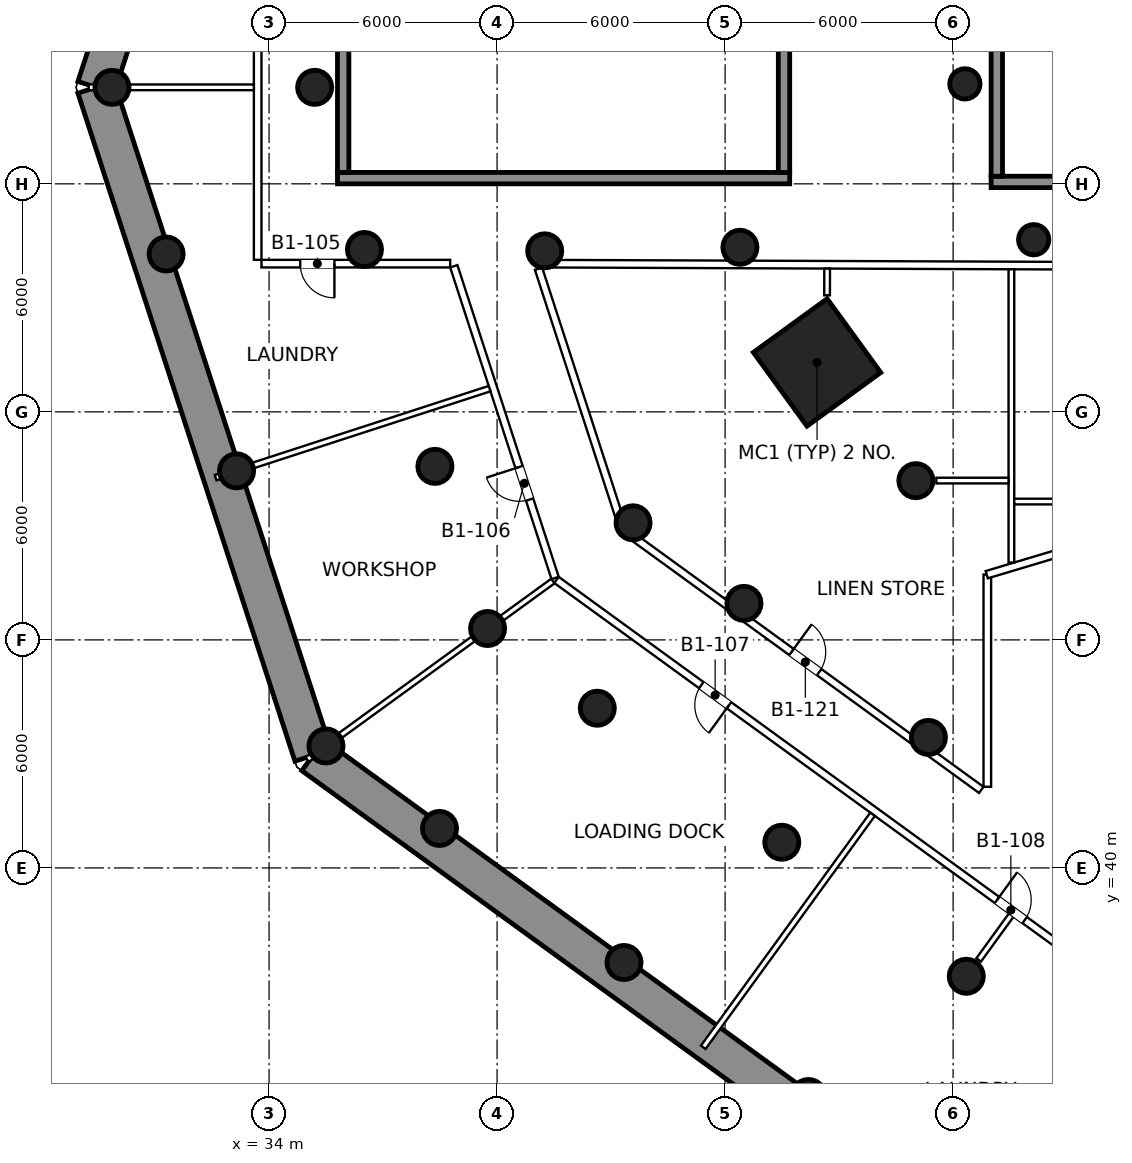
"""IFC4 building model, lengths in metres.
Left out: names, types, materials, properties, quantities, classifications, styles, units other than length and angle.
Written with IfcOpenShell. Run it as: python <this file> out.ifc"""

import sys

from ifc_helpers import new_model, si_unit, direction, frame, frame_2d, origin, origin_2d, place, context, subcontext, project, spatial, rectangle, circle, extrude, element, fill, save


model = new_model("IFC4")
c1 = context("Model", 3, precision=1e-05, world=origin(), true_north=direction((0.0, 1.0)))
c2 = subcontext(c1, "Body", "Model", "MODEL_VIEW")
j1 = project(units=[si_unit("LENGTHUNIT", "METRE"), si_unit("PLANEANGLEUNIT", "RADIAN")], contexts=[c1])
p1 = place(None, origin())
s1 = spatial("IfcSite", under=j1, at=p1, CompositionType="ELEMENT")
p2 = place(p1, origin())
s2 = spatial("IfcBuilding", under=s1, at=p2, CompositionType="ELEMENT")
p3 = place(p2, frame((0.0, 0.0, -5.0)))
s3 = spatial("IfcBuildingStorey", under=s2, at=p3, CompositionType="ELEMENT", Elevation=-5.0)
p4 = place(p3, frame((60.76, 24.361, 0.0), z_axis=(0.0, 0.0, 1.0), x_axis=(-0.809018883304, 0.587782652396, 0.0)))
e1 = element("IfcWall", 1, at=p4, inside=s3, PredefinedType="SOLIDWALL", context=c2, shape_type="SweptSolid", body=[
    extrude(rectangle(XDim=31.647, YDim=1.0, at=frame_2d((15.823, 0.0))), origin(), (0.0, 0.0, 1.0), 4.55),
])
p5 = place(p3, frame((35.156, 42.963, 0.0), z_axis=(0.0, 0.0, 1.0), x_axis=(-0.309001835939, 0.951061441436, 0.0)))
e2 = element("IfcWall", 2, at=p5, inside=s3, PredefinedType="SOLIDWALL", context=c2, shape_type="SweptSolid", body=[
    extrude(rectangle(XDim=18.481, YDim=1.0, at=frame_2d((9.241, 0.0))), origin(), (0.0, 0.0, 1.0), 4.55),
])
p6 = place(p3, frame((29.446, 60.539, 0.0), z_axis=(0.0, 0.0, 1.0), x_axis=(0.309015382076, 0.951057040161, 0.0)))
e3 = element("IfcWall", 3, at=p6, inside=s3, PredefinedType="SOLIDWALL", context=c2, shape_type="SweptSolid", body=[
    extrude(rectangle(XDim=28.348, YDim=1.0, at=frame_2d((14.174, 0.0))), origin(), (0.0, 0.0, 1.0), 4.55),
])
p7 = place(p3, frame((46.39, 56.33, 0.0), z_axis=(0.0, 0.0, 1.0), x_axis=(1.0, 0.0, 0.0)))
e4 = element("IfcColumn", 4, at=p7, inside=s3, PredefinedType="COLUMN", context=c2, shape_type="SweptSolid", body=[
    extrude(circle(Radius=0.45, at=origin_2d()), origin(), (0.0, 0.0, 1.0), 5.0),
])
p8 = place(p3, frame((48.42, 53.3, 0.0), z_axis=(0.0, 0.0, 1.0), x_axis=(-0.809016994375, -0.587785252292, 0.0)))
e5 = element("IfcColumn", 5, at=p8, inside=s3, PredefinedType="COLUMN", context=c2, shape_type="SweptSolid", body=[
    extrude(rectangle(XDim=2.4, YDim=2.4, at=origin_2d()), origin(), (0.0, 0.0, 1.0), 5.0),
])
p9 = place(p3, frame((51.02, 50.19, 0.0), z_axis=(0.0, 0.0, 1.0), x_axis=(1.0, 0.0, 0.0)))
e6 = element("IfcColumn", 6, at=p9, inside=s3, PredefinedType="COLUMN", context=c2, shape_type="SweptSolid", body=[
    extrude(circle(Radius=0.45, at=origin_2d()), origin(), (0.0, 0.0, 1.0), 5.0),
])
for number, where, z_axis, x_axis in (
    (7, (52.31, 60.63, 0.0), (0.0, 0.0, 1.0), (1.0, 0.0, 0.0)),
    (8, (54.12, 56.53, 0.0), (0.0, 0.0, 1.0), (1.0, 0.0, 0.0)),
):
    element("IfcColumn", number, at=place(p3, frame(where, z_axis=z_axis, x_axis=x_axis)), inside=s3, PredefinedType="COLUMN", context=c2, shape_type="SweptSolid", body=[
        extrude(circle(Radius=0.4, at=origin_2d()), origin(), (0.0, 0.0, 1.0), 5.0),
    ])
for number, where, z_axis, x_axis in (
    (9, (29.866, 60.539, 0.0), (0.0, 0.0, 1.0), (1.0, 0.0, 0.0)),
    (10, (31.291, 56.154, 0.0), (0.0, 0.0, 1.0), (1.0, 0.0, 0.0)),
    (11, (33.145, 50.448, 0.0), (0.0, 0.0, 1.0), (1.0, 0.0, 0.0)),
    (12, (35.497, 43.21, 0.0), (0.0, 0.0, 1.0), (1.0, 0.0, 0.0)),
    (13, (38.485, 41.039, 0.0), (0.0, 0.0, 1.0), (1.0, 0.0, 0.0)),
    (14, (43.339, 37.512, 0.0), (0.0, 0.0, 1.0), (1.0, 0.0, 0.0)),
    (15, (48.193, 33.985, 0.0), (0.0, 0.0, 1.0), (1.0, 0.0, 0.0)),
    (16, (35.2, 60.539, 0.0), (0.0, 0.0, 1.0), (1.0, 0.0, 0.0)),
    (17, (36.51, 56.273, 0.0), (0.0, 0.0, 1.0), (1.0, 0.0, 0.0)),
    (18, (38.364, 50.566, 0.0), (0.0, 0.0, 1.0), (1.0, 0.0, 0.0)),
    (19, (39.75, 46.3, 0.0), (0.0, 0.0, 1.0), (1.0, 0.0, 0.0)),
    (20, (42.637, 44.202, 0.0), (0.0, 0.0, 1.0), (1.0, 0.0, 0.0)),
    (21, (47.492, 40.676, 0.0), (0.0, 0.0, 1.0), (1.0, 0.0, 0.0)),
    (22, (52.346, 37.149, 0.0), (0.0, 0.0, 1.0), (1.0, 0.0, 0.0)),
    (23, (41.253, 56.237, 0.0), (0.0, 0.0, 1.0), (1.0, 0.0, 0.0)),
    (24, (43.578, 49.081, 0.0), (0.0, 0.0, 1.0), (1.0, 0.0, 0.0)),
    (25, (46.496, 46.961, 0.0), (0.0, 0.0, 1.0), (1.0, 0.0, 0.0)),
    (26, (51.35, 43.434, 0.0), (0.0, 0.0, 1.0), (1.0, 0.0, 0.0)),
):
    element("IfcColumn", number, at=place(p3, frame(where, z_axis=z_axis, x_axis=x_axis)), inside=s3, PredefinedType="COLUMN", context=c2, shape_type="SweptSolid", body=[
        extrude(circle(Radius=0.45, at=origin_2d()), origin(), (0.0, 0.0, 1.0), 5.0),
    ])
p10 = place(p3, frame((53.0, 58.05, 0.0), z_axis=(0.0, 0.0, 1.0), x_axis=(1.0, 0.0, 0.0)))
e27 = element("IfcWall", 27, at=p10, inside=s3, PredefinedType="SHEAR", context=c2, shape_type="SweptSolid", body=[
    extrude(rectangle(XDim=11.9, YDim=0.3, at=frame_2d((5.95, 0.0))), origin(), (0.0, 0.0, 1.0), 4.55),
])
p11 = place(p3, frame((53.15, 58.2, 0.0), z_axis=(0.0, 0.0, 1.0), x_axis=(0.0, 1.0, 0.0)))
e28 = element("IfcWall", 28, at=p11, inside=s3, PredefinedType="SHEAR", context=c2, shape_type="SweptSolid", body=[
    extrude(rectangle(XDim=3.35, YDim=0.3, at=frame_2d((1.675, 0.0))), origin(), (0.0, 0.0, 1.0), 4.55),
])
p12 = place(p3, frame((35.8, 58.15, 0.0), z_axis=(0.0, 0.0, 1.0), x_axis=(1.0, 0.0, 0.0)))
e29 = element("IfcWall", 29, at=p12, inside=s3, PredefinedType="SHEAR", context=c2, shape_type="SweptSolid", body=[
    extrude(rectangle(XDim=11.9, YDim=0.3, at=frame_2d((5.95, 0.0))), origin(), (0.0, 0.0, 1.0), 4.55),
])
for number, where, z_axis, x_axis in (
    (30, (35.95, 58.3, 0.0), (0.0, 0.0, 1.0), (0.0, 1.0, 0.0)),
    (31, (47.55, 58.3, 0.0), (0.0, 0.0, 1.0), (0.0, 1.0, 0.0)),
):
    element("IfcWall", number, at=place(p3, frame(where, z_axis=z_axis, x_axis=x_axis)), inside=s3, PredefinedType="SHEAR", context=c2, shape_type="SweptSolid", body=[
        extrude(rectangle(XDim=3.35, YDim=0.3, at=frame_2d((1.675, 0.0))), origin(), (0.0, 0.0, 1.0), 4.55),
    ])
p13 = place(p3, frame((41.527, 47.629, 0.0), z_axis=(0.0, 0.0, 1.0), x_axis=(-0.309050865735, 0.951045510156, 0.0)))
e32 = element("IfcWall", 32, at=p13, inside=s3, PredefinedType="PARTITIONING", context=c2, shape_type="SweptSolid", body=[
    extrude(rectangle(XDim=8.624, YDim=0.2, at=frame_2d((4.312, 0.0))), origin(), (0.0, 0.0, 1.0), 4.55),
])
p14 = place(p13, frame((2.169, 0.0, 0.0)))
e33 = element("IfcOpeningElement", 33, at=p14, cuts=e32, PredefinedType="OPENING", context=c2, shape_type="SweptSolid", body=[
    extrude(rectangle(XDim=0.9, YDim=2.1, at=frame_2d((0.45, 1.05))), frame((0.0, 0.11, 0.0), z_axis=(0.0, -1.0, 0.0), x_axis=(1.0, 0.0, 0.0)), (0.0, 0.0, 1.0), 0.22),
])
p15 = place(p3, frame((38.766, 55.9, 0.0), z_axis=(0.0, 0.0, 1.0), x_axis=(-1.0, 0.0, 0.0)))
e34 = element("IfcWall", 34, at=p15, inside=s3, PredefinedType="PARTITIONING", context=c2, shape_type="SweptSolid", body=[
    extrude(rectangle(XDim=4.966, YDim=0.2, at=frame_2d((2.483, 0.0))), origin(), (0.0, 0.0, 1.0), 3.85),
])
p16 = place(p15, frame((3.047, 0.0, 0.0)))
e35 = element("IfcOpeningElement", 35, at=p16, cuts=e34, PredefinedType="OPENING", context=c2, shape_type="SweptSolid", body=[
    extrude(rectangle(XDim=0.9, YDim=2.1, at=frame_2d((0.45, 1.05))), frame((0.0, 0.11, 0.0), z_axis=(0.0, -1.0, 0.0), x_axis=(1.0, 0.0, 0.0)), (0.0, 0.0, 1.0), 0.22),
])
p17 = place(p3, frame((33.7, 56.0, 0.0), z_axis=(0.0, 0.0, 1.0), x_axis=(0.0, 1.0, 0.0)))
e36 = element("IfcWall", 36, at=p17, inside=s3, PredefinedType="PARTITIONING", context=c2, shape_type="SweptSolid", body=[
    extrude(rectangle(XDim=7.95, YDim=0.2, at=frame_2d((3.975, 0.0))), origin(), (0.0, 0.0, 1.0), 4.55),
])
p18 = place(p3, frame((63.17, 31.88, 0.0), z_axis=(0.0, 0.0, 1.0), x_axis=(-0.809016646189, 0.587785731529, 0.0)))
e37 = element("IfcWall", 37, at=p18, inside=s3, PredefinedType="PARTITIONING", context=c2, shape_type="SweptSolid", body=[
    extrude(rectangle(XDim=26.708, YDim=0.2, at=frame_2d((13.354, 0.0))), origin(), (0.0, 0.0, 1.0), 4.55),
])
p19 = place(p18, frame((21.097, 0.0, 0.0)))
e38 = element("IfcOpeningElement", 38, at=p19, cuts=e37, PredefinedType="OPENING", context=c2, shape_type="SweptSolid", body=[
    extrude(rectangle(XDim=0.9, YDim=2.1, at=frame_2d((0.45, 1.05))), frame((0.0, 0.11, 0.0), z_axis=(0.0, -1.0, 0.0), x_axis=(1.0, 0.0, 0.0)), (0.0, 0.0, 1.0), 0.22),
])
p20 = place(p18, frame((11.479, 0.0, 0.0)))
e39 = element("IfcOpeningElement", 39, at=p20, cuts=e37, PredefinedType="OPENING", context=c2, shape_type="SweptSolid", body=[
    extrude(rectangle(XDim=0.9, YDim=2.1, at=frame_2d((0.45, 1.05))), frame((0.0, 0.11, 0.0), z_axis=(0.0, -1.0, 0.0), x_axis=(1.0, 0.0, 0.0)), (0.0, 0.0, 1.0), 0.22),
])
p21 = place(p18, frame((3.211, 0.0, 0.0)))
e40 = element("IfcOpeningElement", 40, at=p21, cuts=e37, PredefinedType="OPENING", context=c2, shape_type="SweptSolid", body=[
    extrude(rectangle(XDim=0.9, YDim=2.1, at=frame_2d((0.45, 1.05))), frame((0.0, 0.11, 0.0), z_axis=(0.0, -1.0, 0.0), x_axis=(1.0, 0.0, 0.0)), (0.0, 0.0, 1.0), 0.22),
])
p22 = place(p3, frame((66.9, 55.8, 0.0), z_axis=(0.0, 0.0, 1.0), x_axis=(-0.999992570732, 0.003854670107, 0.0)))
e41 = element("IfcWall", 41, at=p22, inside=s3, PredefinedType="PARTITIONING", context=c2, shape_type="SweptSolid", body=[
    extrude(rectangle(XDim=25.715, YDim=0.2, at=frame_2d((12.857, 0.0))), origin(), (0.0, 0.0, 1.0), 3.75),
])
p23 = place(p22, frame((6.183, 0.0, 0.0)))
e42 = element("IfcOpeningElement", 42, at=p23, cuts=e41, PredefinedType="OPENING", context=c2, shape_type="SweptSolid", body=[
    extrude(rectangle(XDim=0.9, YDim=2.1, at=frame_2d((0.45, 1.05))), frame((0.0, 0.11, 0.0), z_axis=(0.0, -1.0, 0.0), x_axis=(1.0, 0.0, 0.0)), (0.0, 0.0, 1.0), 0.22),
])
p24 = place(p3, frame((41.09, 55.769, 0.0), z_axis=(0.0, 0.0, 1.0), x_axis=(0.309000124439, -0.951061997504, 0.0)))
e43 = element("IfcWall", 43, at=p24, inside=s3, PredefinedType="PARTITIONING", context=c2, shape_type="SweptSolid", body=[
    extrude(rectangle(XDim=7.194, YDim=0.2, at=frame_2d((3.597, 0.0))), origin(), (0.0, 0.0, 1.0), 3.85),
])
p25 = place(p3, frame((43.349, 48.877, 0.0), z_axis=(0.0, 0.0, 1.0), x_axis=(0.809017904923, -0.587783999028, 0.0)))
e44 = element("IfcWall", 44, at=p25, inside=s3, PredefinedType="PARTITIONING", context=c2, shape_type="SweptSolid", body=[
    extrude(rectangle(XDim=11.609, YDim=0.2, at=frame_2d((5.805, 0.0))), origin(), (0.0, 0.0, 1.0), 3.85),
])
p26 = place(p25, frame((5.436, 0.0, 0.0)))
e45 = element("IfcOpeningElement", 45, at=p26, cuts=e44, PredefinedType="OPENING", context=c2, shape_type="SweptSolid", body=[
    extrude(rectangle(XDim=0.9, YDim=2.1, at=frame_2d((0.45, 1.05))), frame((0.0, 0.11, 0.0), z_axis=(0.0, -1.0, 0.0), x_axis=(1.0, 0.0, 0.0)), (0.0, 0.0, 1.0), 0.22),
])
p27 = place(p3, frame((52.9, 42.134, 0.0), z_axis=(0.0, 0.0, 1.0), x_axis=(0.0, 1.0, 0.0)))
e46 = element("IfcWall", 46, at=p27, inside=s3, PredefinedType="PARTITIONING", context=c2, shape_type="SweptSolid", body=[
    extrude(rectangle(XDim=5.586, YDim=0.2, at=frame_2d((2.793, 0.0))), origin(), (0.0, 0.0, 1.0), 3.85),
])
p28 = place(p3, frame((52.885, 47.716, 0.0), z_axis=(0.0, 0.0, 1.0), x_axis=(0.958064878425, 0.286551371885, 0.0)))
e47 = element("IfcWall", 47, at=p28, inside=s3, PredefinedType="PARTITIONING", context=c2, shape_type="SweptSolid", body=[
    extrude(rectangle(XDim=3.009, YDim=0.2, at=frame_2d((1.505, 0.0))), origin(), (0.0, 0.0, 1.0), 3.85),
])
p29 = place(p3, frame((29.256, 60.539, 0.0), z_axis=(0.0, 0.0, 1.0), x_axis=(1.0, 0.0, 0.0)))
e48 = element("IfcWall", 48, at=p29, inside=s3, PredefinedType="PARTITIONING", context=c2, shape_type="SweptSolid", body=[
    extrude(rectangle(XDim=4.344, YDim=0.15, at=frame_2d((2.172, 0.0))), origin(), (0.0, 0.0, 1.0), 4.55),
])
p30 = place(p3, frame((35.003, 42.851, 0.0), z_axis=(0.0, 0.0, 1.0), x_axis=(0.809022705267, 0.587777391843, 0.0)))
e49 = element("IfcWall", 49, at=p30, inside=s3, PredefinedType="PARTITIONING", context=c2, shape_type="SweptSolid", body=[
    extrude(rectangle(XDim=7.99, YDim=0.15, at=frame_2d((3.995, 0.0))), origin(), (0.0, 0.0, 1.0), 4.55),
])
p31 = place(p3, frame((32.594, 50.269, 0.0), z_axis=(0.0, 0.0, 1.0), x_axis=(0.951058681979, 0.309010329007, 0.0)))
e50 = element("IfcWall", 50, at=p31, inside=s3, PredefinedType="PARTITIONING", context=c2, shape_type="SweptSolid", body=[
    extrude(rectangle(XDim=7.58, YDim=0.15, at=frame_2d((3.79, 0.0))), origin(), (0.0, 0.0, 1.0), 3.85),
])
p32 = place(p3, frame((45.425, 35.28, 0.0), z_axis=(0.0, 0.0, 1.0), x_axis=(0.587779028788, 0.809021515979, 0.0)))
e51 = element("IfcWall", 51, at=p32, inside=s3, PredefinedType="PARTITIONING", context=c2, shape_type="SweptSolid", body=[
    extrude(rectangle(XDim=7.58, YDim=0.15, at=frame_2d((3.79, 0.0))), origin(), (0.0, 0.0, 1.0), 3.85),
])
p33 = place(p3, frame((52.706, 29.99, 0.0), z_axis=(0.0, 0.0, 1.0), x_axis=(0.587800109381, 0.80900619986, 0.0)))
e52 = element("IfcWall", 52, at=p33, inside=s3, PredefinedType="PARTITIONING", context=c2, shape_type="SweptSolid", body=[
    extrude(rectangle(XDim=7.58, YDim=0.15, at=frame_2d((3.79, 0.0))), origin(), (0.0, 0.0, 1.0), 3.85),
])
p34 = place(p3, frame((53.534, 48.037, 0.0), z_axis=(0.0, 0.0, 1.0), x_axis=(0.0, 1.0, 0.0)))
e53 = element("IfcWall", 53, at=p34, inside=s3, PredefinedType="PARTITIONING", context=c2, shape_type="SweptSolid", body=[
    extrude(rectangle(XDim=7.715, YDim=0.15, at=frame_2d((3.857, 0.0))), origin(), (0.0, 0.0, 1.0), 3.85),
])
p35 = place(p3, frame((53.609, 49.64, 0.0), z_axis=(0.0, 0.0, 1.0), x_axis=(1.0, 0.0, 0.0)))
e54 = element("IfcWall", 54, at=p35, inside=s3, PredefinedType="PARTITIONING", context=c2, shape_type="SweptSolid", body=[
    extrude(rectangle(XDim=15.241, YDim=0.15, at=frame_2d((7.621, 0.0))), origin(), (0.0, 0.0, 1.0), 3.75),
])
p36 = place(p3, frame((48.683, 55.066, 0.0), z_axis=(0.0, 0.0, 1.0), x_axis=(0.003812797242, 0.999992731262, 0.0)))
e55 = element("IfcWall", 55, at=p36, inside=s3, PredefinedType="PARTITIONING", context=c2, shape_type="SweptSolid", body=[
    extrude(rectangle(XDim=0.704, YDim=0.15, at=frame_2d((0.352, 0.0))), origin(), (0.0, 0.0, 1.0), 4.55),
])
p37 = place(p3, frame((51.56, 50.192, 0.0), z_axis=(0.0, 0.0, 1.0), x_axis=(1.0, 0.0, 0.0)))
e56 = element("IfcWall", 56, at=p37, inside=s3, PredefinedType="PARTITIONING", context=c2, shape_type="SweptSolid", body=[
    extrude(rectangle(XDim=1.899, YDim=0.15, at=frame_2d((0.949, 0.0))), origin(), (0.0, 0.0, 1.0), 4.55),
])
p38 = place(p3, frame((52.673, 37.579, 0.0), z_axis=(0.0, 0.0, 1.0), x_axis=(0.58775391966, 0.809039757938, 0.0)))
e57 = element("IfcWall", 57, at=p38, inside=s3, PredefinedType="PARTITIONING", context=c2, shape_type="SweptSolid", body=[
    extrude(rectangle(XDim=1.46, YDim=0.15, at=frame_2d((0.73, 0.0))), origin(), (0.0, 0.0, 1.0), 4.55),
])
p39 = place(p16, origin())
e58 = element("IfcDoor", 58, at=p39, inside=s3, OperationType="SINGLE_SWING_LEFT", PredefinedType="DOOR", context=c2, shape_type="SweptSolid", body=[
    extrude(rectangle(XDim=0.9, YDim=2.1, at=frame_2d((0.45, 1.05))), frame((0.0, 0.025, 0.0), z_axis=(0.0, -1.0, 0.0), x_axis=(1.0, 0.0, 0.0)), (0.0, 0.0, 1.0), 0.05),
])
fill(e35, e58)
p40 = place(p14, origin())
e59 = element("IfcDoor", 59, at=p40, inside=s3, OperationType="SINGLE_SWING_RIGHT", PredefinedType="DOOR", context=c2, shape_type="SweptSolid", body=[
    extrude(rectangle(XDim=0.9, YDim=2.1, at=frame_2d((0.45, 1.05))), frame((0.0, 0.025, 0.0), z_axis=(0.0, -1.0, 0.0), x_axis=(1.0, 0.0, 0.0)), (0.0, 0.0, 1.0), 0.05),
])
fill(e33, e59)
p41 = place(p19, origin())
e60 = element("IfcDoor", 60, at=p41, inside=s3, OperationType="SINGLE_SWING_LEFT", PredefinedType="DOOR", context=c2, shape_type="SweptSolid", body=[
    extrude(rectangle(XDim=0.9, YDim=2.1, at=frame_2d((0.45, 1.05))), frame((0.0, 0.025, 0.0), z_axis=(0.0, -1.0, 0.0), x_axis=(1.0, 0.0, 0.0)), (0.0, 0.0, 1.0), 0.05),
])
fill(e38, e60)
p42 = place(p20, frame((0.9, 0.0, 0.0), z_axis=(0.0, 0.0, 1.0), x_axis=(-1.0, 0.0, 0.0)))
e61 = element("IfcDoor", 61, at=p42, inside=s3, OperationType="SINGLE_SWING_LEFT", PredefinedType="DOOR", context=c2, shape_type="SweptSolid", body=[
    extrude(rectangle(XDim=0.9, YDim=2.1, at=frame_2d((0.45, 1.05))), frame((0.0, 0.025, 0.0), z_axis=(0.0, -1.0, 0.0), x_axis=(1.0, 0.0, 0.0)), (0.0, 0.0, 1.0), 0.05),
])
fill(e39, e61)
p43 = place(p26, origin())
e62 = element("IfcDoor", 62, at=p43, inside=s3, OperationType="SINGLE_SWING_LEFT", PredefinedType="DOOR", context=c2, shape_type="SweptSolid", body=[
    extrude(rectangle(XDim=0.9, YDim=2.1, at=frame_2d((0.45, 1.05))), frame((0.0, 0.025, 0.0), z_axis=(0.0, -1.0, 0.0), x_axis=(1.0, 0.0, 0.0)), (0.0, 0.0, 1.0), 0.05),
])
fill(e45, e62)
save(model, sys.argv[1])
